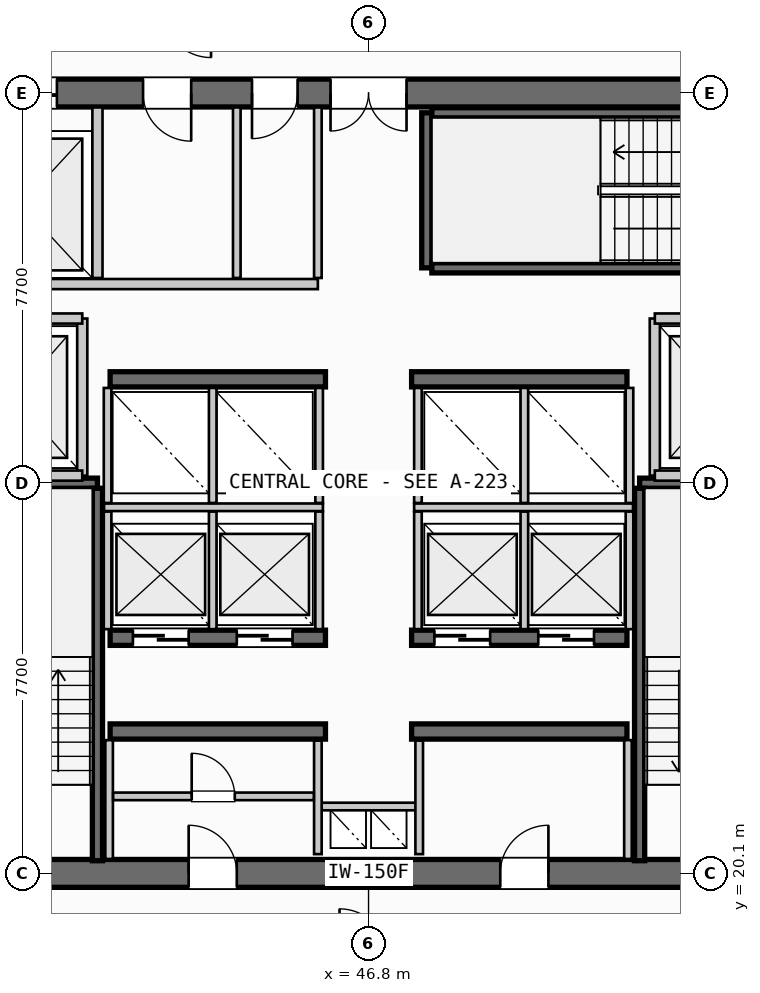
"""IFC4 building model, lengths in metres.
Left out: names, types, materials, properties, quantities, classifications, styles, units other than length and angle.
Written with IfcOpenShell. Run it as: python <this file> out.ifc"""

import sys

from ifc_helpers import new_model, si_unit, direction, frame, frame_2d, origin, place, context, subcontext, project, spatial, rectangle, extrude, source, transform, mapped, element, fill, save


model = new_model("IFC4")
c1 = context("Model", 3, precision=1e-05, world=origin(), true_north=direction((0.0, 1.0)))
c2 = subcontext(c1, "Body", "Model", "MODEL_VIEW")
j1 = project(units=[si_unit("LENGTHUNIT", "METRE"), si_unit("PLANEANGLEUNIT", "RADIAN")], contexts=[c1])
p1 = place(None, origin())
s1 = spatial("IfcSite", under=j1, at=p1, CompositionType="ELEMENT")
p2 = place(p1, origin())
s2 = spatial("IfcBuilding", under=s1, at=p2, CompositionType="ELEMENT")
p3 = place(p2, frame((0.0, 0.0, 167.85)))
s3 = spatial("IfcBuildingStorey", under=s2, at=p3, CompositionType="ELEMENT", Elevation=167.85)
p4 = place(p3, frame((38.0, 20.1, 0.0), z_axis=(0.0, 0.0, 1.0), x_axis=(1.0, 0.0, 0.0)))
e1 = element("IfcWall", 1, at=p4, inside=s3, PredefinedType="SHEAR", context=c2, shape_type="SweptSolid", body=[
    extrude(rectangle(XDim=17.6, YDim=0.55, at=frame_2d((8.8, 0.0))), origin(), (0.0, 0.0, 1.0), 3.24),
])
p5 = place(p4, frame((1.4, 0.0, 0.0)))
e2 = element("IfcOpeningElement", 2, at=p5, cuts=e1, PredefinedType="OPENING", context=c2, shape_type="SweptSolid", body=[
    extrude(rectangle(XDim=1.05, YDim=2.15, at=frame_2d((0.525, 1.075))), frame((0.0, 0.285, 0.0), z_axis=(0.0, -1.0, 0.0), x_axis=(1.0, 0.0, 0.0)), (0.0, 0.0, 1.0), 0.57),
])
p6 = place(p4, frame((15.15, 0.0, 0.0)))
e3 = element("IfcOpeningElement", 3, at=p6, cuts=e1, PredefinedType="OPENING", context=c2, shape_type="SweptSolid", body=[
    extrude(rectangle(XDim=1.05, YDim=2.15, at=frame_2d((0.525, 1.075))), frame((0.0, 0.285, 0.0), z_axis=(0.0, -1.0, 0.0), x_axis=(1.0, 0.0, 0.0)), (0.0, 0.0, 1.0), 0.57),
])
p7 = place(p4, frame((5.25, 0.0, 0.0)))
e4 = element("IfcOpeningElement", 4, at=p7, cuts=e1, PredefinedType="OPENING", context=c2, shape_type="SweptSolid", body=[
    extrude(rectangle(XDim=0.95, YDim=2.15, at=frame_2d((0.475, 1.075))), frame((0.0, 0.285, 0.0), z_axis=(0.0, -1.0, 0.0), x_axis=(1.0, 0.0, 0.0)), (0.0, 0.0, 1.0), 0.57),
])
p8 = place(p4, frame((11.4, 0.0, 0.0)))
e5 = element("IfcOpeningElement", 5, at=p8, cuts=e1, PredefinedType="OPENING", context=c2, shape_type="SweptSolid", body=[
    extrude(rectangle(XDim=0.95, YDim=2.15, at=frame_2d((0.475, 1.075))), frame((0.0, 0.285, 0.0), z_axis=(0.0, -1.0, 0.0), x_axis=(1.0, 0.0, 0.0)), (0.0, 0.0, 1.0), 0.57),
])
p9 = place(p3, frame((55.6, 35.5, 0.0), z_axis=(0.0, 0.0, 1.0), x_axis=(-1.0, 0.0, 0.0)))
e6 = element("IfcWall", 6, at=p9, inside=s3, PredefinedType="SHEAR", context=c2, shape_type="SweptSolid", body=[
    extrude(rectangle(XDim=17.6, YDim=0.55, at=frame_2d((8.8, 0.0))), origin(), (0.0, 0.0, 1.0), 3.24),
])
p10 = place(p9, frame((8.05, 0.0, 0.0)))
e7 = element("IfcOpeningElement", 7, at=p10, cuts=e6, PredefinedType="OPENING", context=c2, shape_type="SweptSolid", body=[
    extrude(rectangle(XDim=1.5, YDim=2.2, at=frame_2d((0.75, 1.1))), frame((0.0, 0.285, 0.0), z_axis=(0.0, -1.0, 0.0), x_axis=(1.0, 0.0, 0.0)), (0.0, 0.0, 1.0), 0.57),
])
p11 = place(p9, frame((14.95, 0.0, 0.0)))
e8 = element("IfcOpeningElement", 8, at=p11, cuts=e6, PredefinedType="OPENING", context=c2, shape_type="SweptSolid", body=[
    extrude(rectangle(XDim=1.4, YDim=2.3, at=frame_2d((0.7, 1.15))), frame((0.0, 0.285, 0.0), z_axis=(0.0, -1.0, 0.0), x_axis=(1.0, 0.0, 0.0)), (0.0, 0.0, 1.0), 0.57),
])
p12 = place(p9, frame((12.3, 0.0, 0.0)))
e9 = element("IfcOpeningElement", 9, at=p12, cuts=e6, PredefinedType="OPENING", context=c2, shape_type="SweptSolid", body=[
    extrude(rectangle(XDim=0.95, YDim=2.15, at=frame_2d((0.475, 1.075))), frame((0.0, 0.285, 0.0), z_axis=(0.0, -1.0, 0.0), x_axis=(1.0, 0.0, 0.0)), (0.0, 0.0, 1.0), 0.57),
])
p13 = place(p9, frame((10.2, 0.0, 0.0)))
e10 = element("IfcOpeningElement", 10, at=p13, cuts=e6, PredefinedType="OPENING", context=c2, shape_type="SweptSolid", body=[
    extrude(rectangle(XDim=0.9, YDim=2.15, at=frame_2d((0.45, 1.075))), frame((0.0, 0.285, 0.0), z_axis=(0.0, -1.0, 0.0), x_axis=(1.0, 0.0, 0.0)), (0.0, 0.0, 1.0), 0.57),
])
for number, where, z_axis, x_axis in (
    (11, (41.7, 22.9, 0.0), (0.0, 0.0, 1.0), (1.0, 0.0, 0.0)),
    (12, (47.65, 22.9, 0.0), (0.0, 0.0, 1.0), (1.0, 0.0, 0.0)),
):
    element("IfcWall", number, at=place(p3, frame(where, z_axis=z_axis, x_axis=x_axis)), inside=s3, PredefinedType="SHEAR", context=c2, shape_type="SweptSolid", body=[
        extrude(rectangle(XDim=4.25, YDim=0.3, at=frame_2d((2.125, 0.0))), origin(), (0.0, 0.0, 1.0), 3.24),
    ])
p14 = place(p3, frame((41.7, 24.75, 0.0), z_axis=(0.0, 0.0, 1.0), x_axis=(1.0, 0.0, 0.0)))
e13 = element("IfcWall", 13, at=p14, inside=s3, PredefinedType="SHEAR", context=c2, shape_type="SweptSolid", body=[
    extrude(rectangle(XDim=4.25, YDim=0.3, at=frame_2d((2.125, 0.0))), origin(), (0.0, 0.0, 1.0), 3.24),
])
p15 = place(p14, frame((0.45, 0.0, 0.0)))
e14 = element("IfcOpeningElement", 14, at=p15, cuts=e13, PredefinedType="OPENING", context=c2, shape_type="SweptSolid", body=[
    extrude(rectangle(XDim=1.1, YDim=2.2, at=frame_2d((0.55, 1.1))), frame((0.0, 0.16, 0.0), z_axis=(0.0, -1.0, 0.0), x_axis=(1.0, 0.0, 0.0)), (0.0, 0.0, 1.0), 0.32),
])
p16 = place(p14, frame((2.5, 0.0, 0.0)))
e15 = element("IfcOpeningElement", 15, at=p16, cuts=e13, PredefinedType="OPENING", context=c2, shape_type="SweptSolid", body=[
    extrude(rectangle(XDim=1.1, YDim=2.2, at=frame_2d((0.55, 1.1))), frame((0.0, 0.16, 0.0), z_axis=(0.0, -1.0, 0.0), x_axis=(1.0, 0.0, 0.0)), (0.0, 0.0, 1.0), 0.32),
])
p17 = place(p3, frame((47.65, 24.75, 0.0), z_axis=(0.0, 0.0, 1.0), x_axis=(1.0, 0.0, 0.0)))
e16 = element("IfcWall", 16, at=p17, inside=s3, PredefinedType="SHEAR", context=c2, shape_type="SweptSolid", body=[
    extrude(rectangle(XDim=4.25, YDim=0.3, at=frame_2d((2.125, 0.0))), origin(), (0.0, 0.0, 1.0), 3.24),
])
p18 = place(p17, frame((0.45, 0.0, 0.0)))
e17 = element("IfcOpeningElement", 17, at=p18, cuts=e16, PredefinedType="OPENING", context=c2, shape_type="SweptSolid", body=[
    extrude(rectangle(XDim=1.1, YDim=2.2, at=frame_2d((0.55, 1.1))), frame((0.0, 0.16, 0.0), z_axis=(0.0, -1.0, 0.0), x_axis=(1.0, 0.0, 0.0)), (0.0, 0.0, 1.0), 0.32),
])
p19 = place(p17, frame((2.5, 0.0, 0.0)))
e18 = element("IfcOpeningElement", 18, at=p19, cuts=e16, PredefinedType="OPENING", context=c2, shape_type="SweptSolid", body=[
    extrude(rectangle(XDim=1.1, YDim=2.2, at=frame_2d((0.55, 1.1))), frame((0.0, 0.16, 0.0), z_axis=(0.0, -1.0, 0.0), x_axis=(1.0, 0.0, 0.0)), (0.0, 0.0, 1.0), 0.32),
])
for number, where, z_axis, x_axis in (
    (19, (41.7, 29.85, 0.0), (0.0, 0.0, 1.0), (1.0, 0.0, 0.0)),
    (20, (47.65, 29.85, 0.0), (0.0, 0.0, 1.0), (1.0, 0.0, 0.0)),
):
    element("IfcWall", number, at=place(p3, frame(where, z_axis=z_axis, x_axis=x_axis)), inside=s3, PredefinedType="SHEAR", context=c2, shape_type="SweptSolid", body=[
        extrude(rectangle(XDim=4.25, YDim=0.3, at=frame_2d((2.125, 0.0))), origin(), (0.0, 0.0, 1.0), 3.24),
    ])
p20 = place(p3, frame((38.39, 27.8, 0.0), z_axis=(0.0, 0.0, 1.0), x_axis=(1.0, 0.0, 0.0)))
e21 = element("IfcWall", 21, at=p20, inside=s3, PredefinedType="SHEAR", context=c2, shape_type="SweptSolid", body=[
    extrude(rectangle(XDim=3.06, YDim=0.2, at=frame_2d((1.53, 0.0))), origin(), (0.0, 0.0, 1.0), 3.24),
])
p21 = place(p3, frame((41.45, 27.7, 0.0), z_axis=(0.0, 0.0, 1.0), x_axis=(0.0, -1.0, 0.0)))
e22 = element("IfcWall", 22, at=p21, inside=s3, PredefinedType="SHEAR", context=c2, shape_type="SweptSolid", body=[
    extrude(rectangle(XDim=7.35, YDim=0.2, at=frame_2d((3.675, 0.0))), origin(), (0.0, 0.0, 1.0), 3.24),
])
p22 = place(p3, frame((52.15, 27.8, 0.0), z_axis=(0.0, 0.0, 1.0), x_axis=(1.0, 0.0, 0.0)))
e23 = element("IfcWall", 23, at=p22, inside=s3, PredefinedType="SHEAR", context=c2, shape_type="SweptSolid", body=[
    extrude(rectangle(XDim=3.06, YDim=0.2, at=frame_2d((1.53, 0.0))), origin(), (0.0, 0.0, 1.0), 3.24),
])
p23 = place(p3, frame((52.15, 20.35, 0.0), z_axis=(0.0, 0.0, 1.0), x_axis=(0.0, 1.0, 0.0)))
e24 = element("IfcWall", 24, at=p23, inside=s3, PredefinedType="SHEAR", context=c2, shape_type="SweptSolid", body=[
    extrude(rectangle(XDim=7.35, YDim=0.2, at=frame_2d((3.675, 0.0))), origin(), (0.0, 0.0, 1.0), 3.24),
])
p24 = place(p3, frame((47.95, 32.05, 0.0), z_axis=(0.0, 0.0, 1.0), x_axis=(0.0, 1.0, 0.0)))
e25 = element("IfcWall", 25, at=p24, inside=s3, PredefinedType="SHEAR", context=c2, shape_type="SweptSolid", body=[
    extrude(rectangle(XDim=3.06, YDim=0.2, at=frame_2d((1.53, 0.0))), origin(), (0.0, 0.0, 1.0), 3.24),
])
for number, where, z_axis, x_axis in (
    (26, (48.05, 35.11, 0.0), (0.0, 0.0, 1.0), (1.0, 0.0, 0.0)),
    (27, (55.4, 32.05, 0.0), (0.0, 0.0, 1.0), (-1.0, 0.0, 0.0)),
):
    element("IfcWall", number, at=place(p3, frame(where, z_axis=z_axis, x_axis=x_axis)), inside=s3, PredefinedType="SHEAR", context=c2, shape_type="SweptSolid", body=[
        extrude(rectangle(XDim=7.35, YDim=0.2, at=frame_2d((3.675, 0.0))), origin(), (0.0, 0.0, 1.0), 3.24),
    ])
p25 = place(p3, frame((45.8, 21.42, 0.0), z_axis=(0.0, 0.0, 1.0), x_axis=(1.0, 0.0, 0.0)))
e28 = element("IfcWall", 28, at=p25, inside=s3, PredefinedType="PARTITIONING", context=c2, shape_type="SweptSolid", body=[
    extrude(rectangle(XDim=2.0, YDim=0.15, at=frame_2d((1.0, 0.0))), origin(), (0.0, 0.0, 1.0), 2.28),
])
for number, where, z_axis, x_axis in (
    (29, (45.8, 20.48, 0.0), (0.0, 0.0, 1.0), (0.0, 1.0, 0.0)),
    (30, (47.8, 20.48, 0.0), (0.0, 0.0, 1.0), (0.0, 1.0, 0.0)),
):
    element("IfcWall", number, at=place(p3, frame(where, z_axis=z_axis, x_axis=x_axis)), inside=s3, PredefinedType="PARTITIONING", context=c2, shape_type="SweptSolid", body=[
        extrude(rectangle(XDim=2.24, YDim=0.15, at=frame_2d((1.12, 0.0))), origin(), (0.0, 0.0, 1.0), 2.28),
    ])
p26 = place(p3, frame((41.15, 27.95, 0.0), z_axis=(0.0, 0.0, 1.0), x_axis=(0.0, 1.0, 0.0)))
e31 = element("IfcWall", 31, at=p26, inside=s3, PredefinedType="PARTITIONING", context=c2, shape_type="SweptSolid", body=[
    extrude(rectangle(XDim=3.1, YDim=0.2, at=frame_2d((1.55, 0.0))), origin(), (0.0, 0.0, 1.0), 2.28),
])
for number, where, z_axis, x_axis in (
    (32, (38.285, 27.95, 0.0), (0.0, 0.0, 1.0), (1.0, 0.0, 0.0)),
    (33, (38.285, 31.05, 0.0), (0.0, 0.0, 1.0), (1.0, 0.0, 0.0)),
):
    element("IfcWall", number, at=place(p3, frame(where, z_axis=z_axis, x_axis=x_axis)), inside=s3, PredefinedType="PARTITIONING", context=c2, shape_type="SweptSolid", body=[
        extrude(rectangle(XDim=2.865, YDim=0.2, at=frame_2d((1.433, 0.0))), origin(), (0.0, 0.0, 1.0), 2.28),
    ])
p27 = place(p3, frame((52.45, 27.95, 0.0), z_axis=(0.0, 0.0, 1.0), x_axis=(0.0, 1.0, 0.0)))
e34 = element("IfcWall", 34, at=p27, inside=s3, PredefinedType="PARTITIONING", context=c2, shape_type="SweptSolid", body=[
    extrude(rectangle(XDim=3.1, YDim=0.2, at=frame_2d((1.55, 0.0))), origin(), (0.0, 0.0, 1.0), 2.28),
])
for number, where, z_axis, x_axis in (
    (35, (52.45, 27.95, 0.0), (0.0, 0.0, 1.0), (1.0, 0.0, 0.0)),
    (36, (52.45, 31.05, 0.0), (0.0, 0.0, 1.0), (1.0, 0.0, 0.0)),
):
    element("IfcWall", number, at=place(p3, frame(where, z_axis=z_axis, x_axis=x_axis)), inside=s3, PredefinedType="PARTITIONING", context=c2, shape_type="SweptSolid", body=[
        extrude(rectangle(XDim=2.865, YDim=0.2, at=frame_2d((1.433, 0.0))), origin(), (0.0, 0.0, 1.0), 2.28),
    ])
for number, where, z_axis, x_axis in (
    (37, (41.68, 20.385, 0.0), (0.0, 0.0, 1.0), (0.0, 1.0, 0.0)),
    (38, (51.92, 20.385, 0.0), (0.0, 0.0, 1.0), (0.0, 1.0, 0.0)),
):
    element("IfcWall", number, at=place(p3, frame(where, z_axis=z_axis, x_axis=x_axis)), inside=s3, PredefinedType="PARTITIONING", context=c2, shape_type="SweptSolid", body=[
        extrude(rectangle(XDim=2.345, YDim=0.15, at=frame_2d((1.172, 0.0))), origin(), (0.0, 0.0, 1.0), 2.28),
    ])
p28 = place(p3, frame((41.76, 21.62, 0.0), z_axis=(0.0, 0.0, 1.0), x_axis=(1.0, 0.0, 0.0)))
e39 = element("IfcWall", 39, at=p28, inside=s3, PredefinedType="PARTITIONING", context=c2, shape_type="SweptSolid", body=[
    extrude(rectangle(XDim=3.96, YDim=0.15, at=frame_2d((1.98, 0.0))), origin(), (0.0, 0.0, 1.0), 2.28),
])
p29 = place(p28, frame((1.55, 0.0, 0.0)))
e40 = element("IfcOpeningElement", 40, at=p29, cuts=e39, PredefinedType="OPENING", context=c2, shape_type="SweptSolid", body=[
    extrude(rectangle(XDim=0.85, YDim=2.15, at=frame_2d((0.425, 1.075))), frame((0.0, 0.085, 0.0), z_axis=(0.0, -1.0, 0.0), x_axis=(1.0, 0.0, 0.0)), (0.0, 0.0, 1.0), 0.17),
])
p30 = place(p3, frame((41.58, 27.325, 0.0), z_axis=(0.0, 0.0, 1.0), x_axis=(1.0, 0.0, 0.0)))
e41 = element("IfcWall", 41, at=p30, inside=s3, PredefinedType="PARTITIONING", context=c2, shape_type="SweptSolid", body=[
    extrude(rectangle(XDim=4.32, YDim=0.15, at=frame_2d((2.16, 0.0))), origin(), (0.0, 0.0, 1.0), 2.28),
])
p31 = place(p3, frame((47.7, 27.325, 0.0), z_axis=(0.0, 0.0, 1.0), x_axis=(1.0, 0.0, 0.0)))
e42 = element("IfcWall", 42, at=p31, inside=s3, PredefinedType="PARTITIONING", context=c2, shape_type="SweptSolid", body=[
    extrude(rectangle(XDim=4.32, YDim=0.15, at=frame_2d((2.16, 0.0))), origin(), (0.0, 0.0, 1.0), 2.28),
])
for number, where, z_axis, x_axis in (
    (43, (41.65, 24.92, 0.0), (0.0, 0.0, 1.0), (0.0, 1.0, 0.0)),
    (44, (43.725, 24.92, 0.0), (0.0, 0.0, 1.0), (0.0, 1.0, 0.0)),
    (45, (45.825, 24.92, 0.0), (0.0, 0.0, 1.0), (0.0, 1.0, 0.0)),
    (46, (47.775, 24.92, 0.0), (0.0, 0.0, 1.0), (0.0, 1.0, 0.0)),
    (47, (49.875, 24.92, 0.0), (0.0, 0.0, 1.0), (0.0, 1.0, 0.0)),
    (48, (51.95, 24.92, 0.0), (0.0, 0.0, 1.0), (0.0, 1.0, 0.0)),
):
    element("IfcWall", number, at=place(p3, frame(where, z_axis=z_axis, x_axis=x_axis)), inside=s3, PredefinedType="PARTITIONING", context=c2, shape_type="SweptSolid", body=[
        extrude(rectangle(XDim=2.32, YDim=0.15, at=frame_2d((1.16, 0.0))), origin(), (0.0, 0.0, 1.0), 2.28),
    ])
for number, where, z_axis, x_axis in (
    (49, (41.65, 27.41, 0.0), (0.0, 0.0, 1.0), (0.0, 1.0, 0.0)),
    (50, (43.725, 27.41, 0.0), (0.0, 0.0, 1.0), (0.0, 1.0, 0.0)),
    (51, (45.825, 27.41, 0.0), (0.0, 0.0, 1.0), (0.0, 1.0, 0.0)),
    (52, (47.775, 27.41, 0.0), (0.0, 0.0, 1.0), (0.0, 1.0, 0.0)),
    (53, (49.875, 27.41, 0.0), (0.0, 0.0, 1.0), (0.0, 1.0, 0.0)),
    (54, (51.95, 27.41, 0.0), (0.0, 0.0, 1.0), (0.0, 1.0, 0.0)),
):
    element("IfcWall", number, at=place(p3, frame(where, z_axis=z_axis, x_axis=x_axis)), inside=s3, PredefinedType="PARTITIONING", context=c2, shape_type="SweptSolid", body=[
        extrude(rectangle(XDim=2.27, YDim=0.15, at=frame_2d((1.135, 0.0))), origin(), (0.0, 0.0, 1.0), 2.28),
    ])
p32 = place(p3, frame((41.45, 31.85, 0.0), z_axis=(0.0, 0.0, 1.0), x_axis=(0.0, 1.0, 0.0)))
e55 = element("IfcWall", 55, at=p32, inside=s3, PredefinedType="PARTITIONING", context=c2, shape_type="SweptSolid", body=[
    extrude(rectangle(XDim=3.365, YDim=0.2, at=frame_2d((1.683, 0.0))), origin(), (0.0, 0.0, 1.0), 2.28),
])
p33 = place(p3, frame((38.285, 31.73, 0.0), z_axis=(0.0, 0.0, 1.0), x_axis=(1.0, 0.0, 0.0)))
e56 = element("IfcWall", 56, at=p33, inside=s3, PredefinedType="PARTITIONING", context=c2, shape_type="SweptSolid", body=[
    extrude(rectangle(XDim=7.515, YDim=0.2, at=frame_2d((3.758, 0.0))), origin(), (0.0, 0.0, 1.0), 2.28),
])
p34 = place(p3, frame((45.8, 31.85, 0.0), z_axis=(0.0, 0.0, 1.0), x_axis=(0.0, 1.0, 0.0)))
e57 = element("IfcWall", 57, at=p34, inside=s3, PredefinedType="PARTITIONING", context=c2, shape_type="SweptSolid", body=[
    extrude(rectangle(XDim=3.365, YDim=0.15, at=frame_2d((1.683, 0.0))), origin(), (0.0, 0.0, 1.0), 2.28),
])
p35 = place(p3, frame((44.2, 31.85, 0.0), z_axis=(0.0, 0.0, 1.0), x_axis=(0.0, 1.0, 0.0)))
e58 = element("IfcWall", 58, at=p35, inside=s3, PredefinedType="PLUMBINGWALL", context=c2, shape_type="SweptSolid", body=[
    extrude(rectangle(XDim=3.365, YDim=0.15, at=frame_2d((1.683, 0.0))), origin(), (0.0, 0.0, 1.0), 2.28),
])
m1 = source(origin(), c2, "Body", "SweptSolid", [
    extrude(rectangle(XDim=1.5, YDim=2.2, at=frame_2d((0.75, 1.1))), frame((0.0, 0.025, 0.0), z_axis=(0.0, -1.0, 0.0), x_axis=(1.0, 0.0, 0.0)), (0.0, 0.0, 1.0), 0.05),
])
p36 = place(p10, origin())
e59 = element("IfcDoor", 59, at=p36, inside=s3, OperationType="DOUBLE_DOOR_SINGLE_SWING", PredefinedType="DOOR", context=c2, shape_type="MappedRepresentation", body=[
    mapped(m1, transform((0.0, 0.0, 0.0), scale=1.0)),
])
fill(e7, e59)
m2 = source(origin(), c2, "Body", "SweptSolid", [
    extrude(rectangle(XDim=0.95, YDim=2.15, at=frame_2d((0.475, 1.075))), frame((0.0, 0.025, 0.0), z_axis=(0.0, -1.0, 0.0), x_axis=(1.0, 0.0, 0.0)), (0.0, 0.0, 1.0), 0.05),
])
p37 = place(p7, origin())
e60 = element("IfcDoor", 60, at=p37, inside=s3, OperationType="SINGLE_SWING_LEFT", PredefinedType="DOOR", context=c2, shape_type="MappedRepresentation", body=[
    mapped(m2, transform((0.0, 0.0, 0.0), scale=1.0)),
])
fill(e4, e60)
p38 = place(p8, origin())
e61 = element("IfcDoor", 61, at=p38, inside=s3, OperationType="SINGLE_SWING_RIGHT", PredefinedType="DOOR", context=c2, shape_type="MappedRepresentation", body=[
    mapped(m2, transform((0.0, 0.0, 0.0), scale=1.0)),
])
fill(e5, e61)
m3 = source(origin(), c2, "Body", "SweptSolid", [
    extrude(rectangle(XDim=1.1, YDim=2.2, at=frame_2d((0.55, 1.1))), frame((0.0, 0.025, 0.0), z_axis=(0.0, -1.0, 0.0), x_axis=(1.0, 0.0, 0.0)), (0.0, 0.0, 1.0), 0.05),
])
p39 = place(p15, origin())
e62 = element("IfcDoor", 62, at=p39, inside=s3, OperationType="SLIDING_TO_RIGHT", PredefinedType="DOOR", context=c2, shape_type="MappedRepresentation", body=[
    mapped(m3, transform((0.0, 0.0, 0.0), scale=1.0)),
])
fill(e14, e62)
p40 = place(p16, origin())
e63 = element("IfcDoor", 63, at=p40, inside=s3, OperationType="SLIDING_TO_RIGHT", PredefinedType="DOOR", context=c2, shape_type="MappedRepresentation", body=[
    mapped(m3, transform((0.0, 0.0, 0.0), scale=1.0)),
])
fill(e15, e63)
p41 = place(p18, origin())
e64 = element("IfcDoor", 64, at=p41, inside=s3, OperationType="SLIDING_TO_RIGHT", PredefinedType="DOOR", context=c2, shape_type="MappedRepresentation", body=[
    mapped(m3, transform((0.0, 0.0, 0.0), scale=1.0)),
])
fill(e17, e64)
p42 = place(p19, origin())
e65 = element("IfcDoor", 65, at=p42, inside=s3, OperationType="SLIDING_TO_RIGHT", PredefinedType="DOOR", context=c2, shape_type="MappedRepresentation", body=[
    mapped(m3, transform((0.0, 0.0, 0.0), scale=1.0)),
])
fill(e18, e65)
m4 = source(origin(), c2, "Body", "SweptSolid", [
    extrude(rectangle(XDim=1.4, YDim=2.3, at=frame_2d((0.7, 1.15))), frame((0.0, 0.025, 0.0), z_axis=(0.0, -1.0, 0.0), x_axis=(1.0, 0.0, 0.0)), (0.0, 0.0, 1.0), 0.05),
])
p43 = place(p11, origin())
e66 = element("IfcDoor", 66, at=p43, inside=s3, OperationType="SLIDING_TO_RIGHT", PredefinedType="DOOR", context=c2, shape_type="MappedRepresentation", body=[
    mapped(m4, transform((0.0, 0.0, 0.0), scale=1.0)),
])
fill(e8, e66)
p44 = place(p12, origin())
e67 = element("IfcDoor", 67, at=p44, inside=s3, OperationType="SINGLE_SWING_LEFT", PredefinedType="DOOR", context=c2, shape_type="MappedRepresentation", body=[
    mapped(m2, transform((0.0, 0.0, 0.0), scale=1.0)),
])
fill(e9, e67)
m5 = source(origin(), c2, "Body", "SweptSolid", [
    extrude(rectangle(XDim=0.9, YDim=2.15, at=frame_2d((0.45, 1.075))), frame((0.0, 0.025, 0.0), z_axis=(0.0, -1.0, 0.0), x_axis=(1.0, 0.0, 0.0)), (0.0, 0.0, 1.0), 0.05),
])
p45 = place(p13, origin())
e68 = element("IfcDoor", 68, at=p45, inside=s3, OperationType="SINGLE_SWING_RIGHT", PredefinedType="DOOR", context=c2, shape_type="MappedRepresentation", body=[
    mapped(m5, transform((0.0, 0.0, 0.0), scale=1.0)),
])
fill(e10, e68)
m6 = source(origin(), c2, "Body", "SweptSolid", [
    extrude(rectangle(XDim=0.85, YDim=2.15, at=frame_2d((0.425, 1.075))), frame((0.0, 0.025, 0.0), z_axis=(0.0, -1.0, 0.0), x_axis=(1.0, 0.0, 0.0)), (0.0, 0.0, 1.0), 0.05),
])
p46 = place(p29, origin())
e69 = element("IfcDoor", 69, at=p46, inside=s3, OperationType="SINGLE_SWING_LEFT", PredefinedType="DOOR", context=c2, shape_type="MappedRepresentation", body=[
    mapped(m6, transform((0.0, 0.0, 0.0), scale=1.0)),
])
fill(e40, e69)
save(model, sys.argv[1])
